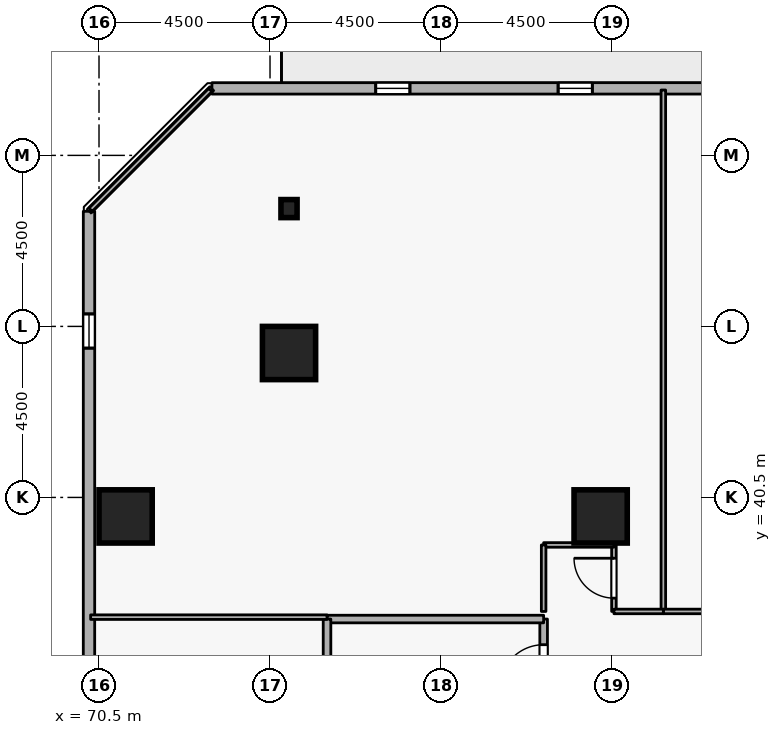
"""IFC4 building model, lengths in metres.
Left out: names, types, materials, properties, quantities, classifications, styles, units other than length and angle.
Written with IfcOpenShell. Run it as: python <this file> out.ifc"""

import sys

from ifc_helpers import new_model, si_unit, direction, frame, frame_2d, origin, origin_2d, place, context, subcontext, project, spatial, rectangle, i_section, extrude, element, fill, save


model = new_model("IFC4")
c1 = context("Model", 3, precision=1e-05, world=origin(), true_north=direction((0.0, 1.0)))
c2 = subcontext(c1, "Body", "Model", "MODEL_VIEW")
j1 = project(units=[si_unit("LENGTHUNIT", "METRE"), si_unit("PLANEANGLEUNIT", "RADIAN")], contexts=[c1])
p1 = place(None, origin())
s1 = spatial("IfcSite", under=j1, at=p1, CompositionType="ELEMENT")
p2 = place(p1, origin())
s2 = spatial("IfcBuilding", under=s1, at=p2, CompositionType="ELEMENT")
p3 = place(p2, frame((0.0, 0.0, 60.9)))
s3 = spatial("IfcBuildingStorey", under=s2, at=p3, CompositionType="ELEMENT", Elevation=60.9)
for number, where, z_axis, x_axis in (
    (1, (75.5, 44.3, 0.0), (0.0, 0.0, 1.0), (1.0, 0.0, 0.0)),
    (2, (71.2, 40.0, 0.0), (0.0, 0.0, 1.0), (1.0, 0.0, 0.0)),
    (3, (83.7, 40.0, 0.0), (0.0, 0.0, 1.0), (1.0, 0.0, 0.0)),
):
    element("IfcColumn", number, at=place(p3, frame(where, z_axis=z_axis, x_axis=x_axis)), inside=s3, PredefinedType="COLUMN", context=c2, shape_type="SweptSolid", body=[
        extrude(rectangle(XDim=1.4, YDim=1.4, at=origin_2d()), origin(), (0.0, 0.0, 1.0), 3.6),
    ])
p4 = place(p3, frame((75.5, 48.1, 0.0), z_axis=(0.0, 0.0, 1.0), x_axis=(1.0, 0.0, 0.0)))
e4 = element("IfcColumn", 4, at=p4, inside=s3, PredefinedType="COLUMN", context=c2, shape_type="SweptSolid", body=[
    extrude(i_section(OverallWidth=0.424, OverallDepth=0.475, WebThickness=0.048, FlangeThickness=0.077, FilletRadius=0.015, at=origin_2d()), origin(), (0.0, 0.0, 1.0), 3.6),
])
p5 = place(p3, frame((110.181, 51.265, 0.0), z_axis=(0.0, 0.0, 1.0), x_axis=(-0.999999998209, -5.985515e-05, 0.0)))
e5 = element("IfcWall", 5, at=p5, inside=s3, PredefinedType="STANDARD", context=c2, shape_type="SweptSolid", body=[
    extrude(rectangle(XDim=36.71, YDim=0.3, at=frame_2d((18.355, 0.0))), origin(), (0.0, 0.0, 1.0), 2.7),
])
p6 = place(p5, frame((20.155, 0.0, 0.0)))
e6 = element("IfcOpeningElement", 6, at=p6, cuts=e5, PredefinedType="OPENING", context=c2, shape_type="SweptSolid", body=[
    extrude(rectangle(XDim=1.0, YDim=2.08, at=frame_2d((0.5, 1.04))), frame((0.0, 0.16, 0.0), z_axis=(0.0, -1.0, 0.0), x_axis=(1.0, 0.0, 0.0)), (0.0, 0.0, 1.0), 0.32),
])
p7 = place(p5, frame((2.7, 0.0, 0.72)))
e7 = element("IfcOpeningElement", 7, at=p7, cuts=e5, PredefinedType="OPENING", context=c2, shape_type="SweptSolid", body=[
    extrude(rectangle(XDim=0.9, YDim=1.75, at=frame_2d((0.45, 0.875))), frame((0.0, 0.16, 0.0), z_axis=(0.0, -1.0, 0.0), x_axis=(1.0, 0.0, 0.0)), (0.0, 0.0, 1.0), 0.32),
])
p8 = place(p5, frame((12.3, 0.0, 0.72)))
e8 = element("IfcOpeningElement", 8, at=p8, cuts=e5, PredefinedType="OPENING", context=c2, shape_type="SweptSolid", body=[
    extrude(rectangle(XDim=0.9, YDim=1.75, at=frame_2d((0.45, 0.875))), frame((0.0, 0.16, 0.0), z_axis=(0.0, -1.0, 0.0), x_axis=(1.0, 0.0, 0.0)), (0.0, 0.0, 1.0), 0.32),
])
p9 = place(p5, frame((17.1, 0.0, 0.72)))
e9 = element("IfcOpeningElement", 9, at=p9, cuts=e5, PredefinedType="OPENING", context=c2, shape_type="SweptSolid", body=[
    extrude(rectangle(XDim=0.9, YDim=1.75, at=frame_2d((0.45, 0.875))), frame((0.0, 0.16, 0.0), z_axis=(0.0, -1.0, 0.0), x_axis=(1.0, 0.0, 0.0)), (0.0, 0.0, 1.0), 0.32),
])
p10 = place(p5, frame((26.7, 0.0, 0.72)))
e10 = element("IfcOpeningElement", 10, at=p10, cuts=e5, PredefinedType="OPENING", context=c2, shape_type="SweptSolid", body=[
    extrude(rectangle(XDim=0.9, YDim=1.75, at=frame_2d((0.45, 0.875))), frame((0.0, 0.16, 0.0), z_axis=(0.0, -1.0, 0.0), x_axis=(1.0, 0.0, 0.0)), (0.0, 0.0, 1.0), 0.32),
])
p11 = place(p5, frame((31.5, 0.0, 0.72)))
e11 = element("IfcOpeningElement", 11, at=p11, cuts=e5, PredefinedType="OPENING", context=c2, shape_type="SweptSolid", body=[
    extrude(rectangle(XDim=0.9, YDim=1.75, at=frame_2d((0.45, 0.875))), frame((0.0, 0.16, 0.0), z_axis=(0.0, -1.0, 0.0), x_axis=(1.0, 0.0, 0.0)), (0.0, 0.0, 1.0), 0.32),
])
p12 = place(p3, frame((70.237, 48.029, 0.0), z_axis=(0.0, 0.0, 1.0), x_axis=(-5.985515e-05, -0.999999998209, 0.0)))
e12 = element("IfcWall", 12, at=p12, inside=s3, PredefinedType="STANDARD", context=c2, shape_type="SweptSolid", body=[
    extrude(rectangle(XDim=36.71, YDim=0.3, at=frame_2d((18.355, 0.0))), origin(), (0.0, 0.0, 1.0), 2.7),
])
p13 = place(p12, frame((2.7, 0.0, 0.72)))
e13 = element("IfcOpeningElement", 13, at=p13, cuts=e12, PredefinedType="OPENING", context=c2, shape_type="SweptSolid", body=[
    extrude(rectangle(XDim=0.9, YDim=1.75, at=frame_2d((0.45, 0.875))), frame((0.0, 0.16, 0.0), z_axis=(0.0, -1.0, 0.0), x_axis=(1.0, 0.0, 0.0)), (0.0, 0.0, 1.0), 0.32),
])
p14 = place(p12, frame((12.3, 0.0, 0.72)))
e14 = element("IfcOpeningElement", 14, at=p14, cuts=e12, PredefinedType="OPENING", context=c2, shape_type="SweptSolid", body=[
    extrude(rectangle(XDim=0.9, YDim=1.75, at=frame_2d((0.45, 0.875))), frame((0.0, 0.16, 0.0), z_axis=(0.0, -1.0, 0.0), x_axis=(1.0, 0.0, 0.0)), (0.0, 0.0, 1.0), 0.32),
])
p15 = place(p12, frame((17.1, 0.0, 0.72)))
e15 = element("IfcOpeningElement", 15, at=p15, cuts=e12, PredefinedType="OPENING", context=c2, shape_type="SweptSolid", body=[
    extrude(rectangle(XDim=0.9, YDim=1.75, at=frame_2d((0.45, 0.875))), frame((0.0, 0.16, 0.0), z_axis=(0.0, -1.0, 0.0), x_axis=(1.0, 0.0, 0.0)), (0.0, 0.0, 1.0), 0.32),
])
p16 = place(p12, frame((26.7, 0.0, 0.72)))
e16 = element("IfcOpeningElement", 16, at=p16, cuts=e12, PredefinedType="OPENING", context=c2, shape_type="SweptSolid", body=[
    extrude(rectangle(XDim=0.9, YDim=1.75, at=frame_2d((0.45, 0.875))), frame((0.0, 0.16, 0.0), z_axis=(0.0, -1.0, 0.0), x_axis=(1.0, 0.0, 0.0)), (0.0, 0.0, 1.0), 0.32),
])
p17 = place(p12, frame((31.5, 0.0, 0.72)))
e17 = element("IfcOpeningElement", 17, at=p17, cuts=e12, PredefinedType="OPENING", context=c2, shape_type="SweptSolid", body=[
    extrude(rectangle(XDim=0.9, YDim=1.75, at=frame_2d((0.45, 0.875))), frame((0.0, 0.16, 0.0), z_axis=(0.0, -1.0, 0.0), x_axis=(1.0, 0.0, 0.0)), (0.0, 0.0, 1.0), 0.32),
])
p18 = place(p3, frame((82.2, 34.8, 0.0), z_axis=(0.0, 0.0, 1.0), x_axis=(0.0, 1.0, 0.0)))
e18 = element("IfcWall", 18, at=p18, inside=s3, PredefinedType="STANDARD", context=c2, shape_type="SweptSolid", body=[
    extrude(rectangle(XDim=2.5, YDim=0.2, at=frame_2d((1.25, 0.0))), origin(), (0.0, 0.0, 1.0), 3.34),
])
p19 = place(p18, frame((0.675, 0.0, 0.0)))
e19 = element("IfcOpeningElement", 19, at=p19, cuts=e18, PredefinedType="OPENING", context=c2, shape_type="SweptSolid", body=[
    extrude(rectangle(XDim=1.15, YDim=2.1, at=frame_2d((0.575, 1.05))), frame((0.0, 0.11, 0.0), z_axis=(0.0, -1.0, 0.0), x_axis=(1.0, 0.0, 0.0)), (0.0, 0.0, 1.0), 0.22),
])
p20 = place(p3, frame((82.2, 37.3, 0.0), z_axis=(0.0, 0.0, 1.0), x_axis=(-1.0, 0.0, 0.0)))
e20 = element("IfcWall", 20, at=p20, inside=s3, PredefinedType="STANDARD", context=c2, shape_type="SweptSolid", body=[
    extrude(rectangle(XDim=5.7, YDim=0.2, at=frame_2d((2.85, 0.0))), origin(), (0.0, 0.0, 1.0), 3.34),
])
p21 = place(p3, frame((76.5, 37.3, 0.0), z_axis=(0.0, 0.0, 1.0), x_axis=(0.0, -1.0, 0.0)))
e21 = element("IfcWall", 21, at=p21, inside=s3, PredefinedType="STANDARD", context=c2, shape_type="SweptSolid", body=[
    extrude(rectangle(XDim=2.5, YDim=0.2, at=frame_2d((1.25, 0.0))), origin(), (0.0, 0.0, 1.0), 3.34),
])
p22 = place(p3, frame((85.35, 37.5, 0.0), z_axis=(0.0, 0.0, 1.0), x_axis=(0.0, 1.0, 0.0)))
e22 = element("IfcWall", 22, at=p22, inside=s3, PredefinedType="PARTITIONING", context=c2, shape_type="SweptSolid", body=[
    extrude(rectangle(XDim=13.72, YDim=0.12, at=frame_2d((6.86, 0.0))), origin(), (0.0, 0.0, 1.0), 3.34),
])
p23 = place(p3, frame((88.5, 37.5, 0.0), z_axis=(0.0, 0.0, 1.0), x_axis=(-1.0, 0.0, 0.0)))
e23 = element("IfcWall", 23, at=p23, inside=s3, PredefinedType="PARTITIONING", context=c2, shape_type="SweptSolid", body=[
    extrude(rectangle(XDim=3.15, YDim=0.12, at=frame_2d((1.575, 0.0))), origin(), (0.0, 0.0, 1.0), 3.34),
])
p24 = place(p23, frame((1.1, 0.0, 0.0)))
e24 = element("IfcOpeningElement", 24, at=p24, cuts=e23, PredefinedType="OPENING", context=c2, shape_type="SweptSolid", body=[
    extrude(rectangle(XDim=0.95, YDim=2.1, at=frame_2d((0.475, 1.05))), frame((0.0, 0.07, 0.0), z_axis=(0.0, -1.0, 0.0), x_axis=(1.0, 0.0, 0.0)), (0.0, 0.0, 1.0), 0.14),
])
p25 = place(p3, frame((84.05, 37.5, 0.0), z_axis=(0.0, 0.0, 1.0), x_axis=(0.0, 1.0, 0.0)))
e25 = element("IfcWall", 25, at=p25, inside=s3, PredefinedType="PARTITIONING", context=c2, shape_type="SweptSolid", body=[
    extrude(rectangle(XDim=1.75, YDim=0.12, at=frame_2d((0.875, 0.0))), origin(), (0.0, 0.0, 1.0), 3.34),
])
p26 = place(p25, frame((0.35, 0.0, 0.0)))
e26 = element("IfcOpeningElement", 26, at=p26, cuts=e25, PredefinedType="OPENING", context=c2, shape_type="SweptSolid", body=[
    extrude(rectangle(XDim=1.05, YDim=2.1, at=frame_2d((0.525, 1.05))), frame((0.0, 0.07, 0.0), z_axis=(0.0, -1.0, 0.0), x_axis=(1.0, 0.0, 0.0)), (0.0, 0.0, 1.0), 0.14),
])
p27 = place(p3, frame((84.05, 39.25, 0.0), z_axis=(0.0, 0.0, 1.0), x_axis=(-1.0, 0.0, 0.0)))
e27 = element("IfcWall", 27, at=p27, inside=s3, PredefinedType="PARTITIONING", context=c2, shape_type="SweptSolid", body=[
    extrude(rectangle(XDim=1.85, YDim=0.12, at=frame_2d((0.925, 0.0))), origin(), (0.0, 0.0, 1.0), 3.34),
])
p28 = place(p3, frame((82.2, 39.25, 0.0), z_axis=(0.0, 0.0, 1.0), x_axis=(0.0, -1.0, 0.0)))
e28 = element("IfcWall", 28, at=p28, inside=s3, PredefinedType="PARTITIONING", context=c2, shape_type="SweptSolid", body=[
    extrude(rectangle(XDim=1.75, YDim=0.12, at=frame_2d((0.875, 0.0))), origin(), (0.0, 0.0, 1.0), 3.34),
])
p29 = place(p3, frame((76.5, 37.35, 0.0), z_axis=(0.0, 0.0, 1.0), x_axis=(-1.0, 0.0, 0.0)))
e29 = element("IfcWall", 29, at=p29, inside=s3, PredefinedType="PARTITIONING", context=c2, shape_type="SweptSolid", body=[
    extrude(rectangle(XDim=6.22, YDim=0.12, at=frame_2d((3.11, 0.0))), origin(), (0.0, 0.0, 1.0), 3.34),
])
p30 = place(p3, frame((70.28, 48.07, 0.0), z_axis=(0.0, 0.0, 1.0), x_axis=(0.707106781187, 0.707106781187, 0.0)))
e30 = element("IfcWall", 30, at=p30, inside=s3, PredefinedType="PARTITIONING", context=c2, shape_type="SweptSolid", body=[
    extrude(rectangle(XDim=4.454, YDim=0.12, at=frame_2d((2.227, 0.0))), origin(), (0.0, 0.0, 1.0), 3.34),
])
p31 = place(p3, frame((85.35, 37.5, 0.0), z_axis=(0.0, 0.0, 1.0), x_axis=(-1.0, 0.0, 0.0)))
e31 = element("IfcWall", 31, at=p31, inside=s3, PredefinedType="PARTITIONING", context=c2, shape_type="SweptSolid", body=[
    extrude(rectangle(XDim=1.3, YDim=0.12, at=frame_2d((0.65, 0.0))), origin(), (0.0, 0.0, 1.0), 3.34),
])
p32 = place(p10, origin())
e32 = element("IfcWindow", 32, at=p32, inside=s3, PartitioningType="SINGLE_PANEL", PredefinedType="WINDOW", context=c2, shape_type="SweptSolid", body=[
    extrude(rectangle(XDim=0.9, YDim=1.75, at=frame_2d((0.45, 0.875))), frame((0.0, 0.03, 0.0), z_axis=(0.0, -1.0, 0.0), x_axis=(1.0, 0.0, 0.0)), (0.0, 0.0, 1.0), 0.06),
])
fill(e10, e32)
p33 = place(p11, origin())
e33 = element("IfcWindow", 33, at=p33, inside=s3, PartitioningType="SINGLE_PANEL", PredefinedType="WINDOW", context=c2, shape_type="SweptSolid", body=[
    extrude(rectangle(XDim=0.9, YDim=1.75, at=frame_2d((0.45, 0.875))), frame((0.0, 0.03, 0.0), z_axis=(0.0, -1.0, 0.0), x_axis=(1.0, 0.0, 0.0)), (0.0, 0.0, 1.0), 0.06),
])
fill(e11, e33)
p34 = place(p13, origin())
e34 = element("IfcWindow", 34, at=p34, inside=s3, PartitioningType="SINGLE_PANEL", PredefinedType="WINDOW", context=c2, shape_type="SweptSolid", body=[
    extrude(rectangle(XDim=0.9, YDim=1.75, at=frame_2d((0.45, 0.875))), frame((0.0, 0.03, 0.0), z_axis=(0.0, -1.0, 0.0), x_axis=(1.0, 0.0, 0.0)), (0.0, 0.0, 1.0), 0.06),
])
fill(e13, e34)
p35 = place(p19, origin())
e35 = element("IfcDoor", 35, at=p35, inside=s3, OperationType="SINGLE_SWING_LEFT", PredefinedType="DOOR", context=c2, shape_type="SweptSolid", body=[
    extrude(rectangle(XDim=1.15, YDim=2.1, at=frame_2d((0.575, 1.05))), frame((0.0, 0.025, 0.0), z_axis=(0.0, -1.0, 0.0), x_axis=(1.0, 0.0, 0.0)), (0.0, 0.0, 1.0), 0.05),
])
fill(e19, e35)
p36 = place(p26, origin())
e36 = element("IfcDoor", 36, at=p36, inside=s3, OperationType="SINGLE_SWING_RIGHT", PredefinedType="DOOR", context=c2, shape_type="SweptSolid", body=[
    extrude(rectangle(XDim=1.05, YDim=2.1, at=frame_2d((0.525, 1.05))), frame((0.0, 0.025, 0.0), z_axis=(0.0, -1.0, 0.0), x_axis=(1.0, 0.0, 0.0)), (0.0, 0.0, 1.0), 0.05),
])
fill(e26, e36)
save(model, sys.argv[1])
